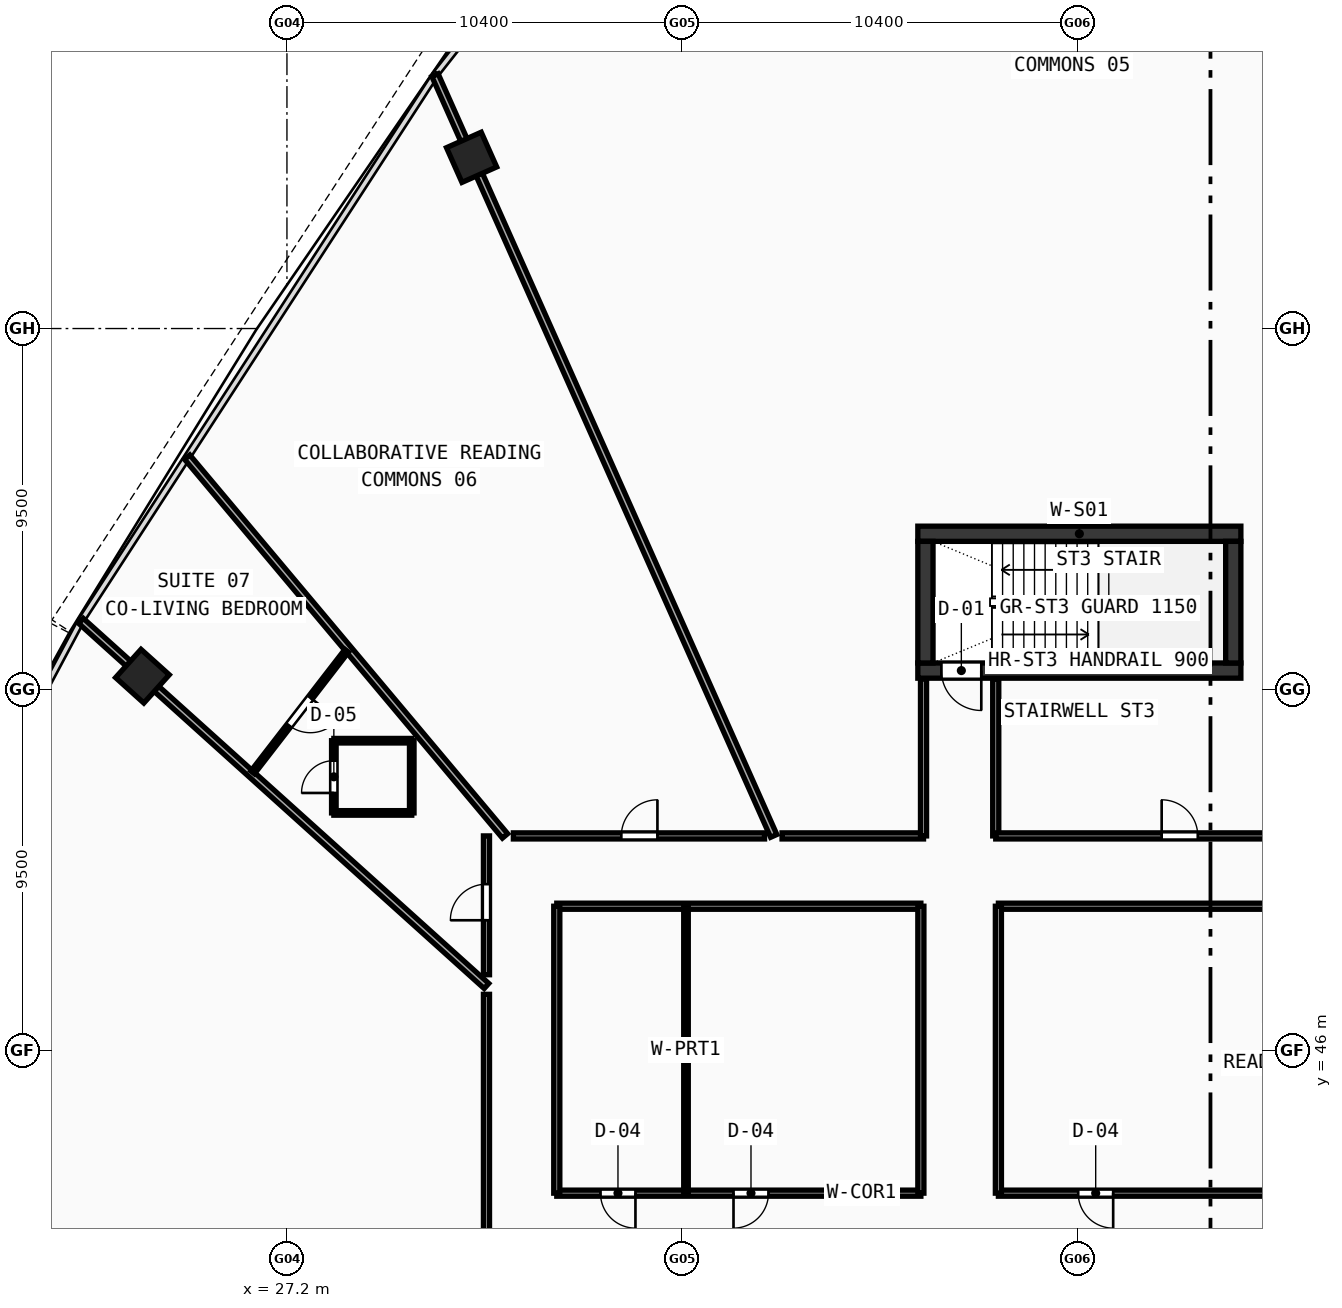
"""IFC4 building model, lengths in metres.
Left out: names, types, materials, properties, quantities, classifications, styles, units other than length and angle.
Written with IfcOpenShell. Run it as: python <this file> out.ifc"""

import sys

from ifc_helpers import new_model, si_unit, direction, frame, frame_2d, origin, origin_with_axes, origin_2d, place, context, subcontext, project, spatial, rectangle, hollow_rectangle, extrude, source, transform, mapped, element, fill, save


model = new_model("IFC4")
c1 = context("Model", 3, precision=1e-05, world=origin(), true_north=direction((0.0, 1.0)))
c2 = subcontext(c1, "Body", "Model", "MODEL_VIEW")
j1 = project(units=[si_unit("LENGTHUNIT", "METRE"), si_unit("PLANEANGLEUNIT", "RADIAN")], contexts=[c1])
p1 = place(None, origin())
s1 = spatial("IfcSite", under=j1, at=p1, CompositionType="ELEMENT")
p2 = place(p1, origin())
s2 = spatial("IfcBuilding", under=s1, at=p2, CompositionType="ELEMENT")
p3 = place(p2, frame((0.0, 0.0, 84.98)))
s3 = spatial("IfcBuildingStorey", under=s2, at=p3, CompositionType="ELEMENT", Elevation=84.98)
p4 = place(p3, frame((43.8, 59.6, 0.0), z_axis=(0.0, 0.0, 1.0), x_axis=(1.0, 0.0, 0.0)))
e1 = element("IfcWall", 1, at=p4, inside=s3, PredefinedType="SHEAR", context=c2, shape_type="SweptSolid", body=[
    extrude(rectangle(XDim=8.5, YDim=0.4, at=frame_2d((4.25, 0.0))), origin(), (0.0, 0.0, 1.0), 3.54),
])
p5 = place(p3, frame((43.8, 56.0, 0.0), z_axis=(0.0, 0.0, 1.0), x_axis=(1.0, 0.0, 0.0)))
e2 = element("IfcWall", 2, at=p5, inside=s3, PredefinedType="SHEAR", context=c2, shape_type="SweptSolid", body=[
    extrude(rectangle(XDim=8.5, YDim=0.4, at=frame_2d((4.25, 0.0))), origin(), (0.0, 0.0, 1.0), 3.54),
])
p6 = place(p5, frame((0.62, 0.0, 0.0)))
e3 = element("IfcOpeningElement", 3, at=p6, cuts=e2, PredefinedType="OPENING", context=c2, shape_type="SweptSolid", body=[
    extrude(rectangle(XDim=1.05, YDim=2.1, at=frame_2d((0.525, 1.05))), frame((0.0, 0.21, 0.0), z_axis=(0.0, -1.0, 0.0), x_axis=(1.0, 0.0, 0.0)), (0.0, 0.0, 1.0), 0.42),
])
for number, where, z_axis, x_axis in (
    (4, (44.0, 56.2, 0.0), (0.0, 0.0, 1.0), (0.0, 1.0, 0.0)),
    (5, (52.1, 56.2, 0.0), (0.0, 0.0, 1.0), (0.0, 1.0, 0.0)),
):
    element("IfcWall", number, at=place(p3, frame(where, z_axis=z_axis, x_axis=x_axis)), inside=s3, PredefinedType="SHEAR", context=c2, shape_type="SweptSolid", body=[
        extrude(rectangle(XDim=3.2, YDim=0.4, at=frame_2d((1.6, 0.0))), origin(), (0.0, 0.0, 1.0), 3.54),
    ])
m1 = source(origin(), c2, "Body", "SweptSolid", [
    extrude(hollow_rectangle(XDim=1.0, YDim=1.0, WallThickness=0.042, at=origin_2d()), origin(), (0.0, 0.0, 1.0), 3.8),
])
for number, where, z_axis, x_axis in (
    (6, (32.059, 69.505, -0.26), (0.0, 0.0, 1.0), (-0.914, -0.407, 0.0)),
    (7, (23.397, 55.852, -0.26), (0.0, 0.0, 1.0), (-0.669, -0.743, 0.0)),
):
    element("IfcColumn", number, at=place(p3, frame(where, z_axis=z_axis, x_axis=x_axis)), inside=s3, PredefinedType="COLUMN", context=c2, shape_type="MappedRepresentation", body=[
        mapped(m1, transform((0.0, 0.0, 0.0), scale=1.0)),
    ])
p7 = place(p3, frame((34.3, 42.25, 0.0), z_axis=(0.0, 0.0, 1.0), x_axis=(1.0, 0.0, 0.0)))
e8 = element("IfcWall", 8, at=p7, inside=s3, PredefinedType="PARTITIONING", context=c2, shape_type="SweptSolid", body=[
    extrude(rectangle(XDim=9.58, YDim=0.16, at=frame_2d((4.79, 0.0))), origin(), (0.0, 0.0, 1.0), 2.84),
])
p8 = place(p7, frame((1.15, 0.0, 0.0)))
e9 = element("IfcOpeningElement", 9, at=p8, cuts=e8, PredefinedType="OPENING", context=c2, shape_type="SweptSolid", body=[
    extrude(rectangle(XDim=0.92, YDim=2.1, at=frame_2d((0.46, 1.05))), frame((0.0, 0.09, 0.0), z_axis=(0.0, -1.0, 0.0), x_axis=(1.0, 0.0, 0.0)), (0.0, 0.0, 1.0), 0.18),
])
p9 = place(p7, frame((4.65, 0.0, 0.0)))
e10 = element("IfcOpeningElement", 10, at=p9, cuts=e8, PredefinedType="OPENING", context=c2, shape_type="SweptSolid", body=[
    extrude(rectangle(XDim=0.92, YDim=2.1, at=frame_2d((0.46, 1.05))), frame((0.0, 0.09, 0.0), z_axis=(0.0, -1.0, 0.0), x_axis=(1.0, 0.0, 0.0)), (0.0, 0.0, 1.0), 0.18),
])
p10 = place(p3, frame((34.3, 49.8, 0.0), z_axis=(0.0, 0.0, 1.0), x_axis=(1.0, 0.0, 0.0)))
e11 = element("IfcWall", 11, at=p10, inside=s3, PredefinedType="PARTITIONING", context=c2, shape_type="SweptSolid", body=[
    extrude(rectangle(XDim=9.58, YDim=0.16, at=frame_2d((4.79, 0.0))), origin(), (0.0, 0.0, 1.0), 2.84),
])
for number, where, z_axis, x_axis in (
    (12, (34.3, 42.25, 0.0), (0.0, 0.0, 1.0), (0.0, 1.0, 0.0)),
    (13, (43.88, 42.25, 0.0), (0.0, 0.0, 1.0), (0.0, 1.0, 0.0)),
):
    element("IfcWall", number, at=place(p3, frame(where, z_axis=z_axis, x_axis=x_axis)), inside=s3, PredefinedType="PARTITIONING", context=c2, shape_type="SweptSolid", body=[
        extrude(rectangle(XDim=7.55, YDim=0.16, at=frame_2d((3.775, 0.0))), origin(), (0.0, 0.0, 1.0), 2.84),
    ])
p11 = place(p3, frame((37.7, 42.25, 0.0), z_axis=(0.0, 0.0, 1.0), x_axis=(0.0, 1.0, 0.0)))
e14 = element("IfcWall", 14, at=p11, inside=s3, PredefinedType="PARTITIONING", context=c2, shape_type="SweptSolid", body=[
    extrude(rectangle(XDim=7.55, YDim=0.12, at=frame_2d((3.775, 0.0))), origin(), (0.0, 0.0, 1.0), 2.84),
])
p12 = place(p3, frame((45.92, 42.25, 0.0), z_axis=(0.0, 0.0, 1.0), x_axis=(1.0, 0.0, 0.0)))
e15 = element("IfcWall", 15, at=p12, inside=s3, PredefinedType="PARTITIONING", context=c2, shape_type="SweptSolid", body=[
    extrude(rectangle(XDim=16.43, YDim=0.16, at=frame_2d((8.215, 0.0))), origin(), (0.0, 0.0, 1.0), 2.84),
])
p13 = place(p12, frame((2.1, 0.0, 0.0)))
e16 = element("IfcOpeningElement", 16, at=p13, cuts=e15, PredefinedType="OPENING", context=c2, shape_type="SweptSolid", body=[
    extrude(rectangle(XDim=0.92, YDim=2.1, at=frame_2d((0.46, 1.05))), frame((0.0, 0.09, 0.0), z_axis=(0.0, -1.0, 0.0), x_axis=(1.0, 0.0, 0.0)), (0.0, 0.0, 1.0), 0.18),
])
p14 = place(p12, frame((14.18, 0.0, 0.0)))
e17 = element("IfcOpeningElement", 17, at=p14, cuts=e15, PredefinedType="OPENING", context=c2, shape_type="SweptSolid", body=[
    extrude(rectangle(XDim=0.94, YDim=2.1, at=frame_2d((0.47, 1.05))), frame((0.0, 0.09, 0.0), z_axis=(0.0, -1.0, 0.0), x_axis=(1.0, 0.0, 0.0)), (0.0, 0.0, 1.0), 0.18),
])
p15 = place(p3, frame((45.92, 49.8, 0.0), z_axis=(0.0, 0.0, 1.0), x_axis=(1.0, 0.0, 0.0)))
e18 = element("IfcWall", 18, at=p15, inside=s3, PredefinedType="PARTITIONING", context=c2, shape_type="SweptSolid", body=[
    extrude(rectangle(XDim=16.43, YDim=0.16, at=frame_2d((8.215, 0.0))), origin(), (0.0, 0.0, 1.0), 2.84),
])
p16 = place(p3, frame((45.92, 42.25, 0.0), z_axis=(0.0, 0.0, 1.0), x_axis=(0.0, 1.0, 0.0)))
e19 = element("IfcWall", 19, at=p16, inside=s3, PredefinedType="PARTITIONING", context=c2, shape_type="SweptSolid", body=[
    extrude(rectangle(XDim=7.55, YDim=0.16, at=frame_2d((3.775, 0.0))), origin(), (0.0, 0.0, 1.0), 3.54),
])
p17 = place(p3, frame((40.008, 51.65, 0.0), z_axis=(0.0, 0.0, 1.0), x_axis=(-0.406733854264, 0.913546699296, 0.0)))
e20 = element("IfcWall", 20, at=p17, inside=s3, PredefinedType="PARTITIONING", context=c2, shape_type="SweptSolid", body=[
    extrude(rectangle(XDim=21.911, YDim=0.18, at=frame_2d((10.956, 0.0))), origin(), (0.0, 0.0, 1.0), 2.84),
])
p18 = place(p3, frame((32.938, 51.65, 0.0), z_axis=(0.0, 0.0, 1.0), x_axis=(-0.642792408097, 0.766040416749, 0.0)))
e21 = element("IfcWall", 21, at=p18, inside=s3, PredefinedType="PARTITIONING", context=c2, shape_type="SweptSolid", body=[
    extrude(rectangle(XDim=13.01, YDim=0.18, at=frame_2d((6.505, 0.0))), origin(), (0.0, 0.0, 1.0), 2.84),
])
p19 = place(p3, frame((32.45, 47.701, 0.0), z_axis=(0.0, 0.0, 1.0), x_axis=(-0.743147852162, 0.66912724487, 0.0)))
e22 = element("IfcWall", 22, at=p19, inside=s3, PredefinedType="PARTITIONING", context=c2, shape_type="SweptSolid", body=[
    extrude(rectangle(XDim=14.357, YDim=0.18, at=frame_2d((7.179, 0.0))), origin(), (0.0, 0.0, 1.0), 2.84),
])
p20 = place(p3, frame((32.45, 31.178, 0.0), z_axis=(0.0, 0.0, 1.0), x_axis=(0.0, 1.0, 0.0)))
e23 = element("IfcWall", 23, at=p20, inside=s3, PredefinedType="PARTITIONING", context=c2, shape_type="SweptSolid", body=[
    extrude(rectangle(XDim=16.304, YDim=0.16, at=frame_2d((8.152, 0.0))), origin(), (0.0, 0.0, 1.0), 2.84),
])
p21 = place(p20, frame((7.677, 0.0, 0.0)))
e24 = element("IfcOpeningElement", 24, at=p21, cuts=e23, PredefinedType="OPENING", context=c2, shape_type="SweptSolid", body=[
    extrude(rectangle(XDim=0.95, YDim=2.1, at=frame_2d((0.475, 1.05))), frame((0.0, 0.09, 0.0), z_axis=(0.0, -1.0, 0.0), x_axis=(1.0, 0.0, 0.0)), (0.0, 0.0, 1.0), 0.18),
])
p22 = place(p3, frame((32.45, 47.997, 0.0), z_axis=(0.0, 0.0, 1.0), x_axis=(0.0, 1.0, 0.0)))
e25 = element("IfcWall", 25, at=p22, inside=s3, PredefinedType="PARTITIONING", context=c2, shape_type="SweptSolid", body=[
    extrude(rectangle(XDim=3.653, YDim=0.16, at=frame_2d((1.826, 0.0))), origin(), (0.0, 0.0, 1.0), 3.54),
])
p23 = place(p22, frame((1.433, 0.0, 0.0)))
e26 = element("IfcOpeningElement", 26, at=p23, cuts=e25, PredefinedType="OPENING", context=c2, shape_type="SweptSolid", body=[
    extrude(rectangle(XDim=0.95, YDim=2.1, at=frame_2d((0.475, 1.05))), frame((0.0, 0.09, 0.0), z_axis=(0.0, -1.0, 0.0), x_axis=(1.0, 0.0, 0.0)), (0.0, 0.0, 1.0), 0.18),
])
p24 = place(p3, frame((33.158, 51.65, 0.0), z_axis=(0.0, 0.0, 1.0), x_axis=(1.0, 0.0, 0.0)))
e27 = element("IfcWall", 27, at=p24, inside=s3, PredefinedType="PARTITIONING", context=c2, shape_type="SweptSolid", body=[
    extrude(rectangle(XDim=6.609, YDim=0.16, at=frame_2d((3.305, 0.0))), origin(), (0.0, 0.0, 1.0), 3.54),
])
p25 = place(p24, frame((2.84, 0.0, 0.0)))
e28 = element("IfcOpeningElement", 28, at=p25, cuts=e27, PredefinedType="OPENING", context=c2, shape_type="SweptSolid", body=[
    extrude(rectangle(XDim=0.95, YDim=2.1, at=frame_2d((0.475, 1.05))), frame((0.0, 0.09, 0.0), z_axis=(0.0, -1.0, 0.0), x_axis=(1.0, 0.0, 0.0)), (0.0, 0.0, 1.0), 0.18),
])
p26 = place(p3, frame((40.228, 51.65, 0.0), z_axis=(0.0, 0.0, 1.0), x_axis=(1.0, 0.0, 0.0)))
e29 = element("IfcWall", 29, at=p26, inside=s3, PredefinedType="PARTITIONING", context=c2, shape_type="SweptSolid", body=[
    extrude(rectangle(XDim=3.722, YDim=0.16, at=frame_2d((1.861, 0.0))), origin(), (0.0, 0.0, 1.0), 2.84),
])
for number, where, z_axis, x_axis in (
    (30, (43.95, 51.65, 0.0), (0.0, 0.0, 1.0), (0.0, 1.0, 0.0)),
    (31, (45.85, 55.78, 0.0), (0.0, 0.0, 1.0), (0.0, -1.0, 0.0)),
):
    element("IfcWall", number, at=place(p3, frame(where, z_axis=z_axis, x_axis=x_axis)), inside=s3, PredefinedType="PARTITIONING", context=c2, shape_type="SweptSolid", body=[
        extrude(rectangle(XDim=4.13, YDim=0.16, at=frame_2d((2.065, 0.0))), origin(), (0.0, 0.0, 1.0), 3.54),
    ])
p27 = place(p3, frame((45.85, 51.65, 0.0), z_axis=(0.0, 0.0, 1.0), x_axis=(1.0, 0.0, 0.0)))
e32 = element("IfcWall", 32, at=p27, inside=s3, PredefinedType="PARTITIONING", context=c2, shape_type="SweptSolid", body=[
    extrude(rectangle(XDim=9.922, YDim=0.16, at=frame_2d((4.961, 0.0))), origin(), (0.0, 0.0, 1.0), 2.84),
])
p28 = place(p27, frame((4.366, 0.0, 0.0)))
e33 = element("IfcOpeningElement", 33, at=p28, cuts=e32, PredefinedType="OPENING", context=c2, shape_type="SweptSolid", body=[
    extrude(rectangle(XDim=0.95, YDim=2.1, at=frame_2d((0.475, 1.05))), frame((0.0, 0.09, 0.0), z_axis=(0.0, -1.0, 0.0), x_axis=(1.0, 0.0, 0.0)), (0.0, 0.0, 1.0), 0.18),
])
p29 = place(p3, frame((28.434, 52.255, 0.0), z_axis=(0.0, 0.0, 1.0), x_axis=(1.0, 0.0, 0.0)))
e34 = element("IfcWall", 34, at=p29, inside=s3, PredefinedType="PARTITIONING", context=c2, shape_type="SweptSolid", body=[
    extrude(rectangle(XDim=2.05, YDim=0.12, at=frame_2d((1.025, 0.0))), origin(), (0.0, 0.0, 1.0), 3.14),
])
p30 = place(p3, frame((30.484, 52.255, 0.0), z_axis=(0.0, 0.0, 1.0), x_axis=(0.0, 1.0, 0.0)))
e35 = element("IfcWall", 35, at=p30, inside=s3, PredefinedType="PARTITIONING", context=c2, shape_type="SweptSolid", body=[
    extrude(rectangle(XDim=1.9, YDim=0.12, at=frame_2d((0.95, 0.0))), origin(), (0.0, 0.0, 1.0), 3.14),
])
p31 = place(p3, frame((30.484, 54.155, 0.0), z_axis=(0.0, 0.0, 1.0), x_axis=(-1.0, 0.0, 0.0)))
e36 = element("IfcWall", 36, at=p31, inside=s3, PredefinedType="PARTITIONING", context=c2, shape_type="SweptSolid", body=[
    extrude(rectangle(XDim=2.05, YDim=0.12, at=frame_2d((1.025, 0.0))), origin(), (0.0, 0.0, 1.0), 3.54),
])
p32 = place(p3, frame((28.434, 54.155, 0.0), z_axis=(0.0, 0.0, 1.0), x_axis=(0.0, -1.0, 0.0)))
e37 = element("IfcWall", 37, at=p32, inside=s3, PredefinedType="PARTITIONING", context=c2, shape_type="SweptSolid", body=[
    extrude(rectangle(XDim=1.9, YDim=0.12, at=frame_2d((0.95, 0.0))), origin(), (0.0, 0.0, 1.0), 3.54),
])
p33 = place(p32, frame((0.525, 0.0, 0.0)))
e38 = element("IfcOpeningElement", 38, at=p33, cuts=e37, PredefinedType="OPENING", context=c2, shape_type="SweptSolid", body=[
    extrude(rectangle(XDim=0.85, YDim=2.1, at=frame_2d((0.425, 1.05))), frame((0.0, 0.07, 0.0), z_axis=(0.0, -1.0, 0.0), x_axis=(1.0, 0.0, 0.0)), (0.0, 0.0, 1.0), 0.14),
])
p34 = place(p3, frame((28.772, 56.521, 0.0), z_axis=(0.0, 0.0, 1.0), x_axis=(-0.611610665825, -0.791158892669, 0.0)))
e39 = element("IfcWall", 39, at=p34, inside=s3, PredefinedType="PARTITIONING", context=c2, shape_type="SweptSolid", body=[
    extrude(rectangle(XDim=4.045, YDim=0.12, at=frame_2d((2.022, 0.0))), origin(), (0.0, 0.0, 1.0), 2.84),
])
p35 = place(p34, frame((1.562, 0.0, 0.0)))
e40 = element("IfcOpeningElement", 40, at=p35, cuts=e39, PredefinedType="OPENING", context=c2, shape_type="SweptSolid", body=[
    extrude(rectangle(XDim=0.92, YDim=2.1, at=frame_2d((0.46, 1.05))), frame((0.0, 0.07, 0.0), z_axis=(0.0, -1.0, 0.0), x_axis=(1.0, 0.0, 0.0)), (0.0, 0.0, 1.0), 0.14),
])
m2 = source(origin(), c2, "Body", "SweptSolid", [
    extrude(rectangle(XDim=1.05, YDim=2.1, at=frame_2d((0.525, 1.05))), frame((0.0, 0.025, 0.0), z_axis=(0.0, -1.0, 0.0), x_axis=(1.0, 0.0, 0.0)), (0.0, 0.0, 1.0), 0.05),
])
p36 = place(p6, frame((1.05, 0.0, 0.0), z_axis=(0.0, 0.0, 1.0), x_axis=(-1.0, 0.0, 0.0)))
e41 = element("IfcDoor", 41, at=p36, inside=s3, OperationType="SINGLE_SWING_LEFT", PredefinedType="DOOR", context=c2, shape_type="MappedRepresentation", body=[
    mapped(m2, transform((0.0, 0.0, 0.0), scale=1.0)),
])
fill(e3, e41)
m3 = source(origin(), c2, "Body", "SweptSolid", [
    extrude(rectangle(XDim=0.92, YDim=2.1, at=frame_2d((0.46, 1.05))), frame((0.0, 0.025, 0.0), z_axis=(0.0, -1.0, 0.0), x_axis=(1.0, 0.0, 0.0)), (0.0, 0.0, 1.0), 0.05),
])
p37 = place(p8, frame((0.92, 0.0, 0.0), z_axis=(0.0, 0.0, 1.0), x_axis=(-1.0, 0.0, 0.0)))
e42 = element("IfcDoor", 42, at=p37, inside=s3, OperationType="SINGLE_SWING_LEFT", PredefinedType="DOOR", context=c2, shape_type="MappedRepresentation", body=[
    mapped(m3, transform((0.0, 0.0, 0.0), scale=1.0)),
])
fill(e9, e42)
p38 = place(p9, frame((0.92, 0.0, 0.0), z_axis=(0.0, 0.0, 1.0), x_axis=(-1.0, 0.0, 0.0)))
e43 = element("IfcDoor", 43, at=p38, inside=s3, OperationType="SINGLE_SWING_RIGHT", PredefinedType="DOOR", context=c2, shape_type="MappedRepresentation", body=[
    mapped(m3, transform((0.0, 0.0, 0.0), scale=1.0)),
])
fill(e10, e43)
p39 = place(p13, frame((0.92, 0.0, 0.0), z_axis=(0.0, 0.0, 1.0), x_axis=(-1.0, 0.0, 0.0)))
e44 = element("IfcDoor", 44, at=p39, inside=s3, OperationType="SINGLE_SWING_LEFT", PredefinedType="DOOR", context=c2, shape_type="MappedRepresentation", body=[
    mapped(m3, transform((0.0, 0.0, 0.0), scale=1.0)),
])
fill(e16, e44)
m4 = source(origin(), c2, "Body", "SweptSolid", [
    extrude(rectangle(XDim=0.95, YDim=2.1, at=frame_2d((0.475, 1.05))), frame((0.0, 0.025, 0.0), z_axis=(0.0, -1.0, 0.0), x_axis=(1.0, 0.0, 0.0)), (0.0, 0.0, 1.0), 0.05),
])
p40 = place(p28, origin_with_axes())
e45 = element("IfcDoor", 45, at=p40, inside=s3, OperationType="SINGLE_SWING_LEFT", PredefinedType="DOOR", context=c2, shape_type="MappedRepresentation", body=[
    mapped(m4, transform((0.0, 0.0, 0.0), scale=1.0)),
])
fill(e33, e45)
p41 = place(p25, origin_with_axes())
e46 = element("IfcDoor", 46, at=p41, inside=s3, OperationType="SINGLE_SWING_RIGHT", PredefinedType="DOOR", context=c2, shape_type="MappedRepresentation", body=[
    mapped(m4, transform((0.0, 0.0, 0.0), scale=1.0)),
])
fill(e28, e46)
p42 = place(p23, origin_with_axes())
e47 = element("IfcDoor", 47, at=p42, inside=s3, OperationType="SINGLE_SWING_LEFT", PredefinedType="DOOR", context=c2, shape_type="MappedRepresentation", body=[
    mapped(m4, transform((0.0, 0.0, 0.0), scale=1.0)),
])
fill(e26, e47)
m5 = source(origin(), c2, "Body", "SweptSolid", [
    extrude(rectangle(XDim=0.85, YDim=2.1, at=frame_2d((0.425, 1.05))), frame((0.0, 0.025, 0.0), z_axis=(0.0, -1.0, 0.0), x_axis=(1.0, 0.0, 0.0)), (0.0, 0.0, 1.0), 0.05),
])
p43 = place(p33, frame((0.85, 0.0, 0.0), z_axis=(0.0, 0.0, 1.0), x_axis=(-1.0, 0.0, 0.0)))
e48 = element("IfcDoor", 48, at=p43, inside=s3, OperationType="SINGLE_SWING_LEFT", PredefinedType="DOOR", context=c2, shape_type="MappedRepresentation", body=[
    mapped(m5, transform((0.0, 0.0, 0.0), scale=1.0)),
])
fill(e38, e48)
p44 = place(p35, origin_with_axes())
e49 = element("IfcDoor", 49, at=p44, inside=s3, OperationType="SINGLE_SWING_LEFT", PredefinedType="DOOR", context=c2, shape_type="MappedRepresentation", body=[
    mapped(m3, transform((0.0, 0.0, 0.0), scale=1.0)),
])
fill(e40, e49)
save(model, sys.argv[1])
